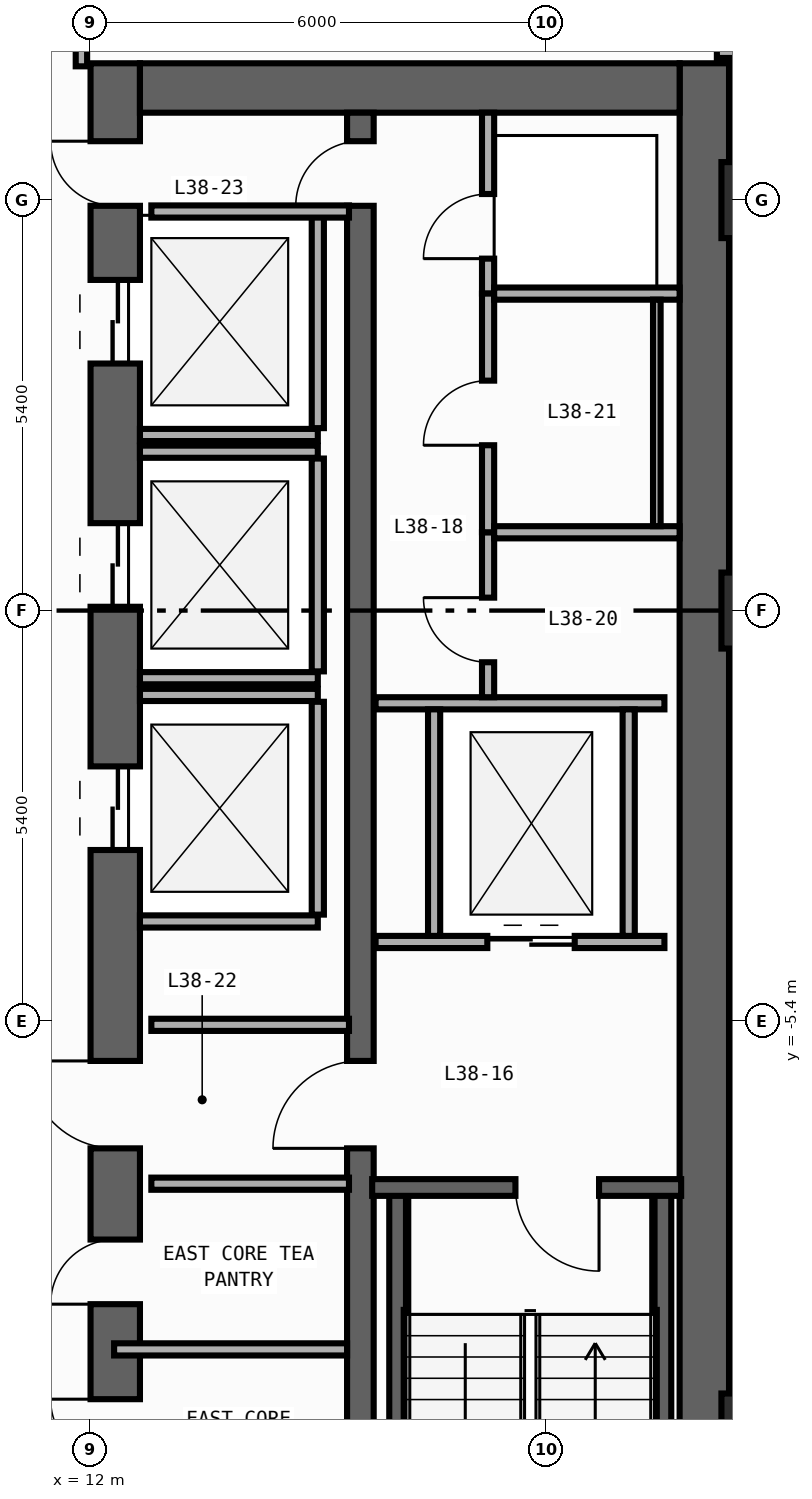
"""IFC4 building model, lengths in metres.
Left out: names, types, materials, properties, quantities, classifications, styles, units other than length and angle.
Written with IfcOpenShell. Run it as: python <this file> out.ifc"""

import sys

from ifc_helpers import new_model, si_unit, direction, frame, frame_2d, origin, origin_2d, place, context, subcontext, project, spatial, rectangle, extrude, element, fill, save


model = new_model("IFC4")
c1 = context("Model", 3, precision=1e-05, world=origin(), true_north=direction((0.0, 1.0)))
c2 = subcontext(c1, "Body", "Model", "MODEL_VIEW")
j1 = project(units=[si_unit("LENGTHUNIT", "METRE"), si_unit("PLANEANGLEUNIT", "RADIAN")], contexts=[c1])
p1 = place(None, origin())
s1 = spatial("IfcSite", under=j1, at=p1, CompositionType="ELEMENT")
p2 = place(p1, origin())
s2 = spatial("IfcBuilding", under=s1, at=p2, CompositionType="ELEMENT")
p3 = place(p2, frame((0.0, 0.0, 168.8)))
s3 = spatial("IfcBuildingStorey", under=s2, at=p3, CompositionType="ELEMENT", Elevation=168.8)
p4 = place(p3, frame((12.325, -19.8, 0.0), z_axis=(0.0, 0.0, 1.0), x_axis=(0.0, 1.0, 0.0)))
e1 = element("IfcWall", 1, at=p4, inside=s3, PredefinedType="SHEAR", context=c2, shape_type="SweptSolid", body=[
    extrude(rectangle(XDim=27.0, YDim=0.65, at=frame_2d((13.5, 0.0))), origin(), (0.0, 0.0, 1.0), 3.54),
])
p5 = place(p4, frame((23.05, 0.0, 0.0)))
e2 = element("IfcOpeningElement", 2, at=p5, cuts=e1, PredefinedType="OPENING", context=c2, shape_type="SweptSolid", body=[
    extrude(rectangle(XDim=1.1, YDim=2.2, at=frame_2d((0.55, 1.1))), frame((0.0, 0.335, 0.0), z_axis=(0.0, -1.0, 0.0), x_axis=(1.0, 0.0, 0.0)), (0.0, 0.0, 1.0), 0.67),
])
p6 = place(p4, frame((19.85, 0.0, 0.0)))
e3 = element("IfcOpeningElement", 3, at=p6, cuts=e1, PredefinedType="OPENING", context=c2, shape_type="SweptSolid", body=[
    extrude(rectangle(XDim=1.1, YDim=2.2, at=frame_2d((0.55, 1.1))), frame((0.0, 0.335, 0.0), z_axis=(0.0, -1.0, 0.0), x_axis=(1.0, 0.0, 0.0)), (0.0, 0.0, 1.0), 0.67),
])
p7 = place(p4, frame((16.65, 0.0, 0.0)))
e4 = element("IfcOpeningElement", 4, at=p7, cuts=e1, PredefinedType="OPENING", context=c2, shape_type="SweptSolid", body=[
    extrude(rectangle(XDim=1.1, YDim=2.2, at=frame_2d((0.55, 1.1))), frame((0.0, 0.335, 0.0), z_axis=(0.0, -1.0, 0.0), x_axis=(1.0, 0.0, 0.0)), (0.0, 0.0, 1.0), 0.67),
])
p8 = place(p4, frame((6.275, 0.0, 0.0)))
e5 = element("IfcOpeningElement", 5, at=p8, cuts=e1, PredefinedType="OPENING", context=c2, shape_type="SweptSolid", body=[
    extrude(rectangle(XDim=0.85, YDim=2.1, at=frame_2d((0.425, 1.05))), frame((0.0, 0.335, 0.0), z_axis=(0.0, -1.0, 0.0), x_axis=(1.0, 0.0, 0.0)), (0.0, 0.0, 1.0), 0.67),
])
p9 = place(p4, frame((8.575, 0.0, 0.0)))
e6 = element("IfcOpeningElement", 6, at=p9, cuts=e1, PredefinedType="OPENING", context=c2, shape_type="SweptSolid", body=[
    extrude(rectangle(XDim=0.85, YDim=2.1, at=frame_2d((0.425, 1.05))), frame((0.0, 0.335, 0.0), z_axis=(0.0, -1.0, 0.0), x_axis=(1.0, 0.0, 0.0)), (0.0, 0.0, 1.0), 0.67),
])
p10 = place(p4, frame((10.675, 0.0, 0.0)))
e7 = element("IfcOpeningElement", 7, at=p10, cuts=e1, PredefinedType="OPENING", context=c2, shape_type="SweptSolid", body=[
    extrude(rectangle(XDim=0.85, YDim=2.1, at=frame_2d((0.425, 1.05))), frame((0.0, 0.335, 0.0), z_axis=(0.0, -1.0, 0.0), x_axis=(1.0, 0.0, 0.0)), (0.0, 0.0, 1.0), 0.67),
])
p11 = place(p4, frame((12.725, 0.0, 0.0)))
e8 = element("IfcOpeningElement", 8, at=p11, cuts=e1, PredefinedType="OPENING", context=c2, shape_type="SweptSolid", body=[
    extrude(rectangle(XDim=1.15, YDim=2.2, at=frame_2d((0.575, 1.1))), frame((0.0, 0.335, 0.0), z_axis=(0.0, -1.0, 0.0), x_axis=(1.0, 0.0, 0.0)), (0.0, 0.0, 1.0), 0.67),
])
p12 = place(p4, frame((25.125, 0.0, 0.0)))
e9 = element("IfcOpeningElement", 9, at=p12, cuts=e1, PredefinedType="OPENING", context=c2, shape_type="SweptSolid", body=[
    extrude(rectangle(XDim=0.85, YDim=2.1, at=frame_2d((0.425, 1.05))), frame((0.0, 0.335, 0.0), z_axis=(0.0, -1.0, 0.0), x_axis=(1.0, 0.0, 0.0)), (0.0, 0.0, 1.0), 0.67),
])
p13 = place(p3, frame((20.075, -19.8, 0.0), z_axis=(0.0, 0.0, 1.0), x_axis=(0.0, 1.0, 0.0)))
e10 = element("IfcWall", 10, at=p13, inside=s3, PredefinedType="SHEAR", context=c2, shape_type="SweptSolid", body=[
    extrude(rectangle(XDim=27.0, YDim=0.65, at=frame_2d((13.5, 0.0))), origin(), (0.0, 0.0, 1.0), 3.54),
])
p14 = place(p3, frame((12.65, 6.875, 0.0), z_axis=(0.0, 0.0, 1.0), x_axis=(1.0, 0.0, 0.0)))
e11 = element("IfcWall", 11, at=p14, inside=s3, PredefinedType="SHEAR", context=c2, shape_type="SweptSolid", body=[
    extrude(rectangle(XDim=7.1, YDim=0.65, at=frame_2d((3.55, 0.0))), origin(), (0.0, 0.0, 1.0), 3.54),
])
p15 = place(p3, frame((15.55, -19.15, 0.0), z_axis=(0.0, 0.0, 1.0), x_axis=(0.0, 1.0, 0.0)))
e12 = element("IfcWall", 12, at=p15, inside=s3, PredefinedType="SHEAR", context=c2, shape_type="SweptSolid", body=[
    extrude(rectangle(XDim=25.7, YDim=0.35, at=frame_2d((12.85, 0.0))), origin(), (0.0, 0.0, 1.0), 3.54),
])
p16 = place(p15, frame((12.075, 0.0, 0.0)))
e13 = element("IfcOpeningElement", 13, at=p16, cuts=e12, PredefinedType="OPENING", context=c2, shape_type="SweptSolid", body=[
    extrude(rectangle(XDim=1.15, YDim=2.2, at=frame_2d((0.575, 1.1))), frame((0.0, 0.185, 0.0), z_axis=(0.0, -1.0, 0.0), x_axis=(1.0, 0.0, 0.0)), (0.0, 0.0, 1.0), 0.37),
])
p17 = place(p15, frame((24.475, 0.0, 0.0)))
e14 = element("IfcOpeningElement", 14, at=p17, cuts=e12, PredefinedType="OPENING", context=c2, shape_type="SweptSolid", body=[
    extrude(rectangle(XDim=0.85, YDim=2.1, at=frame_2d((0.425, 1.05))), frame((0.0, 0.185, 0.0), z_axis=(0.0, -1.0, 0.0), x_axis=(1.0, 0.0, 0.0)), (0.0, 0.0, 1.0), 0.37),
])
for number, where, z_axis, x_axis in (
    (15, (16.04, -19.01, 0.0), (0.0, 0.0, 1.0), (0.0, 1.0, 0.0)),
    (16, (19.53, -19.01, 0.0), (0.0, 0.0, 1.0), (0.0, 1.0, 0.0)),
):
    element("IfcWall", number, at=place(p3, frame(where, z_axis=z_axis, x_axis=x_axis)), inside=s3, PredefinedType="SHEAR", context=c2, shape_type="SweptSolid", body=[
        extrude(rectangle(XDim=11.42, YDim=0.22, at=frame_2d((5.71, 0.0))), origin(), (0.0, 0.0, 1.0), 3.54),
    ])
p18 = place(p3, frame((19.77, -7.59, 0.0), z_axis=(0.0, 0.0, 1.0), x_axis=(-1.0, 0.0, 0.0)))
e17 = element("IfcWall", 17, at=p18, inside=s3, PredefinedType="SHEAR", context=c2, shape_type="SweptSolid", body=[
    extrude(rectangle(XDim=4.065, YDim=0.22, at=frame_2d((2.032, 0.0))), origin(), (0.0, 0.0, 1.0), 3.54),
])
p19 = place(p18, frame((1.08, 0.0, 0.0)))
e18 = element("IfcOpeningElement", 18, at=p19, cuts=e17, PredefinedType="OPENING", context=c2, shape_type="SweptSolid", body=[
    extrude(rectangle(XDim=1.1, YDim=2.2, at=frame_2d((0.55, 1.1))), frame((0.0, 0.12, 0.0), z_axis=(0.0, -1.0, 0.0), x_axis=(1.0, 0.0, 0.0)), (0.0, 0.0, 1.0), 0.24),
])
for number, where, z_axis, x_axis in (
    (19, (20.8, -10.8, 0.0), (0.0, 0.0, 1.0), (1.0, 0.0, 0.0)),
    (20, (20.8, 0.0, 0.0), (0.0, 0.0, 1.0), (1.0, 0.0, 0.0)),
    (21, (20.8, 5.4, 0.0), (0.0, 0.0, 1.0), (1.0, 0.0, 0.0)),
):
    element("IfcColumn", number, at=place(p3, frame(where, z_axis=z_axis, x_axis=x_axis)), inside=s3, PredefinedType="COLUMN", context=c2, shape_type="SweptSolid", body=[
        extrude(rectangle(XDim=1.0, YDim=1.0, at=origin_2d()), origin(), (0.0, 0.0, 1.0), 3.8),
    ])
p20 = place(p3, frame((12.65, 2.31, 0.0), z_axis=(0.0, 0.0, 1.0), x_axis=(1.0, 0.0, 0.0)))
e22 = element("IfcWall", 22, at=p20, inside=s3, PredefinedType="STANDARD", context=c2, shape_type="SweptSolid", body=[
    extrude(rectangle(XDim=2.34, YDim=0.16, at=frame_2d((1.17, 0.0))), origin(), (0.0, 0.0, 1.0), 3.54),
])
p21 = place(p3, frame((14.99, 2.4, 0.0), z_axis=(0.0, 0.0, 1.0), x_axis=(0.0, 1.0, 0.0)))
e23 = element("IfcWall", 23, at=p21, inside=s3, PredefinedType="STANDARD", context=c2, shape_type="SweptSolid", body=[
    extrude(rectangle(XDim=2.8, YDim=0.16, at=frame_2d((1.4, 0.0))), origin(), (0.0, 0.0, 1.0), 3.54),
])
for number, where, z_axis, x_axis in (
    (24, (12.65, -0.89, 0.0), (0.0, 0.0, 1.0), (1.0, 0.0, 0.0)),
    (25, (12.65, 2.09, 0.0), (0.0, 0.0, 1.0), (1.0, 0.0, 0.0)),
):
    element("IfcWall", number, at=place(p3, frame(where, z_axis=z_axis, x_axis=x_axis)), inside=s3, PredefinedType="STANDARD", context=c2, shape_type="SweptSolid", body=[
        extrude(rectangle(XDim=2.34, YDim=0.16, at=frame_2d((1.17, 0.0))), origin(), (0.0, 0.0, 1.0), 3.54),
    ])
p22 = place(p3, frame((14.99, -0.8, 0.0), z_axis=(0.0, 0.0, 1.0), x_axis=(0.0, 1.0, 0.0)))
e26 = element("IfcWall", 26, at=p22, inside=s3, PredefinedType="STANDARD", context=c2, shape_type="SweptSolid", body=[
    extrude(rectangle(XDim=2.8, YDim=0.16, at=frame_2d((1.4, 0.0))), origin(), (0.0, 0.0, 1.0), 3.54),
])
for number, where, z_axis, x_axis in (
    (27, (12.65, -4.09, 0.0), (0.0, 0.0, 1.0), (1.0, 0.0, 0.0)),
    (28, (12.65, -1.11, 0.0), (0.0, 0.0, 1.0), (1.0, 0.0, 0.0)),
):
    element("IfcWall", number, at=place(p3, frame(where, z_axis=z_axis, x_axis=x_axis)), inside=s3, PredefinedType="STANDARD", context=c2, shape_type="SweptSolid", body=[
        extrude(rectangle(XDim=2.34, YDim=0.16, at=frame_2d((1.17, 0.0))), origin(), (0.0, 0.0, 1.0), 3.54),
    ])
p23 = place(p3, frame((14.99, -4.0, 0.0), z_axis=(0.0, 0.0, 1.0), x_axis=(0.0, 1.0, 0.0)))
e29 = element("IfcWall", 29, at=p23, inside=s3, PredefinedType="STANDARD", context=c2, shape_type="SweptSolid", body=[
    extrude(rectangle(XDim=2.8, YDim=0.16, at=frame_2d((1.4, 0.0))), origin(), (0.0, 0.0, 1.0), 3.54),
])
p24 = place(p3, frame((15.75, -4.36, 0.0), z_axis=(0.0, 0.0, 1.0), x_axis=(1.0, 0.0, 0.0)))
e30 = element("IfcWall", 30, at=p24, inside=s3, PredefinedType="STANDARD", context=c2, shape_type="SweptSolid", body=[
    extrude(rectangle(XDim=3.8, YDim=0.16, at=frame_2d((1.9, 0.0))), origin(), (0.0, 0.0, 1.0), 3.54),
])
p25 = place(p24, frame((1.47, 0.0, 0.0)))
e31 = element("IfcOpeningElement", 31, at=p25, cuts=e30, PredefinedType="OPENING", context=c2, shape_type="SweptSolid", body=[
    extrude(rectangle(XDim=1.15, YDim=2.2, at=frame_2d((0.575, 1.1))), frame((0.0, 0.09, 0.0), z_axis=(0.0, -1.0, 0.0), x_axis=(1.0, 0.0, 0.0)), (0.0, 0.0, 1.0), 0.18),
])
p26 = place(p3, frame((15.75, -1.22, 0.0), z_axis=(0.0, 0.0, 1.0), x_axis=(1.0, 0.0, 0.0)))
e32 = element("IfcWall", 32, at=p26, inside=s3, PredefinedType="STANDARD", context=c2, shape_type="SweptSolid", body=[
    extrude(rectangle(XDim=3.8, YDim=0.16, at=frame_2d((1.9, 0.0))), origin(), (0.0, 0.0, 1.0), 3.54),
])
for number, where, z_axis, x_axis in (
    (33, (16.52, -4.28, 0.0), (0.0, 0.0, 1.0), (0.0, 1.0, 0.0)),
    (34, (19.08, -4.28, 0.0), (0.0, 0.0, 1.0), (0.0, 1.0, 0.0)),
):
    element("IfcWall", number, at=place(p3, frame(where, z_axis=z_axis, x_axis=x_axis)), inside=s3, PredefinedType="STANDARD", context=c2, shape_type="SweptSolid", body=[
        extrude(rectangle(XDim=2.98, YDim=0.16, at=frame_2d((1.49, 0.0))), origin(), (0.0, 0.0, 1.0), 3.54),
    ])
for number, where, z_axis, x_axis in (
    (35, (12.8, -5.45, 0.0), (0.0, 0.0, 1.0), (1.0, 0.0, 0.0)),
    (36, (12.8, -7.54, 0.0), (0.0, 0.0, 1.0), (1.0, 0.0, 0.0)),
    (37, (12.8, 5.25, 0.0), (0.0, 0.0, 1.0), (1.0, 0.0, 0.0)),
):
    element("IfcWall", number, at=place(p3, frame(where, z_axis=z_axis, x_axis=x_axis)), inside=s3, PredefinedType="STANDARD", context=c2, shape_type="SweptSolid", body=[
        extrude(rectangle(XDim=2.6, YDim=0.16, at=frame_2d((1.3, 0.0))), origin(), (0.0, 0.0, 1.0), 3.54),
    ])
p27 = place(p3, frame((17.23, 4.17, 0.0), z_axis=(0.0, 0.0, 1.0), x_axis=(0.0, 1.0, 0.0)))
e38 = element("IfcWall", 38, at=p27, inside=s3, PredefinedType="PARTITIONING", context=c2, shape_type="SweptSolid", body=[
    extrude(rectangle(XDim=2.38, YDim=0.16, at=frame_2d((1.19, 0.0))), origin(), (0.0, 0.0, 1.0), 3.54),
])
p28 = place(p27, frame((0.46, 0.0, 0.0)))
e39 = element("IfcOpeningElement", 39, at=p28, cuts=e38, PredefinedType="OPENING", context=c2, shape_type="SweptSolid", body=[
    extrude(rectangle(XDim=0.85, YDim=2.1, at=frame_2d((0.425, 1.05))), frame((0.0, 0.09, 0.0), z_axis=(0.0, -1.0, 0.0), x_axis=(1.0, 0.0, 0.0)), (0.0, 0.0, 1.0), 0.18),
])
p29 = place(p3, frame((17.23, -1.14, 0.0), z_axis=(0.0, 0.0, 1.0), x_axis=(0.0, 1.0, 0.0)))
e40 = element("IfcWall", 40, at=p29, inside=s3, PredefinedType="PARTITIONING", context=c2, shape_type="SweptSolid", body=[
    extrude(rectangle(XDim=2.17, YDim=0.16, at=frame_2d((1.085, 0.0))), origin(), (0.0, 0.0, 1.0), 3.54),
])
p30 = place(p29, frame((0.46, 0.0, 0.0)))
e41 = element("IfcOpeningElement", 41, at=p30, cuts=e40, PredefinedType="OPENING", context=c2, shape_type="SweptSolid", body=[
    extrude(rectangle(XDim=0.85, YDim=2.1, at=frame_2d((0.425, 1.05))), frame((0.0, 0.09, 0.0), z_axis=(0.0, -1.0, 0.0), x_axis=(1.0, 0.0, 0.0)), (0.0, 0.0, 1.0), 0.18),
])
p31 = place(p3, frame((17.23, 1.03, 0.0), z_axis=(0.0, 0.0, 1.0), x_axis=(0.0, 1.0, 0.0)))
e42 = element("IfcWall", 42, at=p31, inside=s3, PredefinedType="PARTITIONING", context=c2, shape_type="SweptSolid", body=[
    extrude(rectangle(XDim=3.14, YDim=0.16, at=frame_2d((1.57, 0.0))), origin(), (0.0, 0.0, 1.0), 3.54),
])
p32 = place(p31, frame((1.145, 0.0, 0.0)))
e43 = element("IfcOpeningElement", 43, at=p32, cuts=e42, PredefinedType="OPENING", context=c2, shape_type="SweptSolid", body=[
    extrude(rectangle(XDim=0.85, YDim=2.1, at=frame_2d((0.425, 1.05))), frame((0.0, 0.09, 0.0), z_axis=(0.0, -1.0, 0.0), x_axis=(1.0, 0.0, 0.0)), (0.0, 0.0, 1.0), 0.18),
])
for number, where, z_axis, x_axis in (
    (44, (17.31, 4.17, 0.0), (0.0, 0.0, 1.0), (1.0, 0.0, 0.0)),
    (45, (17.31, 1.03, 0.0), (0.0, 0.0, 1.0), (1.0, 0.0, 0.0)),
):
    element("IfcWall", number, at=place(p3, frame(where, z_axis=z_axis, x_axis=x_axis)), inside=s3, PredefinedType="PARTITIONING", context=c2, shape_type="SweptSolid", body=[
        extrude(rectangle(XDim=2.44, YDim=0.16, at=frame_2d((1.22, 0.0))), origin(), (0.0, 0.0, 1.0), 3.54),
    ])
p33 = place(p3, frame((12.31, -9.72, 0.0), z_axis=(0.0, 0.0, 1.0), x_axis=(1.0, 0.0, 0.0)))
e46 = element("IfcWall", 46, at=p33, inside=s3, PredefinedType="PARTITIONING", context=c2, shape_type="SweptSolid", body=[
    extrude(rectangle(XDim=3.065, YDim=0.16, at=frame_2d((1.532, 0.0))), origin(), (0.0, 0.0, 1.0), 3.54),
])
p34 = place(p3, frame((11.88, 7.16, 0.0), z_axis=(0.0, 0.0, 1.0), x_axis=(0.0, 1.0, 0.0)))
e47 = element("IfcWall", 47, at=p34, inside=s3, PredefinedType="PARTITIONING", context=c2, shape_type="SweptSolid", body=[
    extrude(rectangle(XDim=8.455, YDim=0.15, at=frame_2d((4.228, 0.0))), origin(), (0.0, 0.0, 1.0), 3.54),
])
p35 = place(p34, frame((0.46, 0.0, 0.0)))
e48 = element("IfcOpeningElement", 48, at=p35, cuts=e47, PredefinedType="OPENING", context=c2, shape_type="SweptSolid", body=[
    extrude(rectangle(XDim=0.9, YDim=2.15, at=frame_2d((0.45, 1.075))), frame((0.0, 0.085, 0.0), z_axis=(0.0, -1.0, 0.0), x_axis=(1.0, 0.0, 0.0)), (0.0, 0.0, 1.0), 0.17),
])
p36 = place(p3, frame((20.24, 7.34, 0.0), z_axis=(0.0, 0.0, 1.0), x_axis=(1.0, 0.0, 0.0)))
e49 = element("IfcWall", 49, at=p36, inside=s3, PredefinedType="PARTITIONING", context=c2, shape_type="SweptSolid", body=[
    extrude(rectangle(XDim=2.215, YDim=0.14, at=frame_2d((1.107, 0.0))), origin(), (0.0, 0.0, 1.0), 3.54),
])
p37 = place(p36, frame((0.905, 0.0, 0.0)))
e50 = element("IfcOpeningElement", 50, at=p37, cuts=e49, PredefinedType="OPENING", context=c2, shape_type="SweptSolid", body=[
    extrude(rectangle(XDim=0.85, YDim=2.1, at=frame_2d((0.425, 1.05))), frame((0.0, 0.08, 0.0), z_axis=(0.0, -1.0, 0.0), x_axis=(1.0, 0.0, 0.0)), (0.0, 0.0, 1.0), 0.16),
])
p38 = place(p3, frame((19.45, 4.09, 0.0), z_axis=(0.0, 0.0, 1.0), x_axis=(0.0, -1.0, 0.0)))
e51 = element("IfcWall", 51, at=p38, inside=s3, PredefinedType="PARTITIONING", context=c2, shape_type="SweptSolid", body=[
    extrude(rectangle(XDim=2.98, YDim=0.1, at=frame_2d((1.49, 0.0))), origin(), (0.0, 0.0, 1.0), 3.54),
])
p39 = place(p19, origin())
e52 = element("IfcDoor", 52, at=p39, inside=s3, OperationType="SINGLE_SWING_LEFT", PredefinedType="DOOR", context=c2, shape_type="SweptSolid", body=[
    extrude(rectangle(XDim=1.1, YDim=2.2, at=frame_2d((0.55, 1.1))), frame((0.0, 0.025, 0.0), z_axis=(0.0, -1.0, 0.0), x_axis=(1.0, 0.0, 0.0)), (0.0, 0.0, 1.0), 0.05),
])
fill(e18, e52)
p40 = place(p5, origin())
e53 = element("IfcDoor", 53, at=p40, inside=s3, OperationType="DOUBLE_DOOR_SLIDING", PredefinedType="DOOR", context=c2, shape_type="SweptSolid", body=[
    extrude(rectangle(XDim=1.1, YDim=2.2, at=frame_2d((0.55, 1.1))), frame((0.0, 0.025, 0.0), z_axis=(0.0, -1.0, 0.0), x_axis=(1.0, 0.0, 0.0)), (0.0, 0.0, 1.0), 0.05),
])
fill(e2, e53)
p41 = place(p6, origin())
e54 = element("IfcDoor", 54, at=p41, inside=s3, OperationType="DOUBLE_DOOR_SLIDING", PredefinedType="DOOR", context=c2, shape_type="SweptSolid", body=[
    extrude(rectangle(XDim=1.1, YDim=2.2, at=frame_2d((0.55, 1.1))), frame((0.0, 0.025, 0.0), z_axis=(0.0, -1.0, 0.0), x_axis=(1.0, 0.0, 0.0)), (0.0, 0.0, 1.0), 0.05),
])
fill(e3, e54)
p42 = place(p7, origin())
e55 = element("IfcDoor", 55, at=p42, inside=s3, OperationType="DOUBLE_DOOR_SLIDING", PredefinedType="DOOR", context=c2, shape_type="SweptSolid", body=[
    extrude(rectangle(XDim=1.1, YDim=2.2, at=frame_2d((0.55, 1.1))), frame((0.0, 0.025, 0.0), z_axis=(0.0, -1.0, 0.0), x_axis=(1.0, 0.0, 0.0)), (0.0, 0.0, 1.0), 0.05),
])
fill(e4, e55)
p43 = place(p9, origin())
e56 = element("IfcDoor", 56, at=p43, inside=s3, OperationType="SINGLE_SWING_RIGHT", PredefinedType="DOOR", context=c2, shape_type="SweptSolid", body=[
    extrude(rectangle(XDim=0.85, YDim=2.1, at=frame_2d((0.425, 1.05))), frame((0.0, 0.025, 0.0), z_axis=(0.0, -1.0, 0.0), x_axis=(1.0, 0.0, 0.0)), (0.0, 0.0, 1.0), 0.05),
])
fill(e6, e56)
p44 = place(p10, origin())
e57 = element("IfcDoor", 57, at=p44, inside=s3, OperationType="SINGLE_SWING_LEFT", PredefinedType="DOOR", context=c2, shape_type="SweptSolid", body=[
    extrude(rectangle(XDim=0.85, YDim=2.1, at=frame_2d((0.425, 1.05))), frame((0.0, 0.025, 0.0), z_axis=(0.0, -1.0, 0.0), x_axis=(1.0, 0.0, 0.0)), (0.0, 0.0, 1.0), 0.05),
])
fill(e7, e57)
p45 = place(p11, origin())
e58 = element("IfcDoor", 58, at=p45, inside=s3, OperationType="SINGLE_SWING_RIGHT", PredefinedType="DOOR", context=c2, shape_type="SweptSolid", body=[
    extrude(rectangle(XDim=1.15, YDim=2.2, at=frame_2d((0.575, 1.1))), frame((0.0, 0.025, 0.0), z_axis=(0.0, -1.0, 0.0), x_axis=(1.0, 0.0, 0.0)), (0.0, 0.0, 1.0), 0.05),
])
fill(e8, e58)
p46 = place(p16, origin())
e59 = element("IfcDoor", 59, at=p46, inside=s3, OperationType="SINGLE_SWING_LEFT", PredefinedType="DOOR", context=c2, shape_type="SweptSolid", body=[
    extrude(rectangle(XDim=1.15, YDim=2.2, at=frame_2d((0.575, 1.1))), frame((0.0, 0.025, 0.0), z_axis=(0.0, -1.0, 0.0), x_axis=(1.0, 0.0, 0.0)), (0.0, 0.0, 1.0), 0.05),
])
fill(e13, e59)
p47 = place(p12, origin())
e60 = element("IfcDoor", 60, at=p47, inside=s3, OperationType="SINGLE_SWING_RIGHT", PredefinedType="DOOR", context=c2, shape_type="SweptSolid", body=[
    extrude(rectangle(XDim=0.85, YDim=2.1, at=frame_2d((0.425, 1.05))), frame((0.0, 0.025, 0.0), z_axis=(0.0, -1.0, 0.0), x_axis=(1.0, 0.0, 0.0)), (0.0, 0.0, 1.0), 0.05),
])
fill(e9, e60)
p48 = place(p17, origin())
e61 = element("IfcDoor", 61, at=p48, inside=s3, OperationType="SINGLE_SWING_LEFT", PredefinedType="DOOR", context=c2, shape_type="SweptSolid", body=[
    extrude(rectangle(XDim=0.85, YDim=2.1, at=frame_2d((0.425, 1.05))), frame((0.0, 0.025, 0.0), z_axis=(0.0, -1.0, 0.0), x_axis=(1.0, 0.0, 0.0)), (0.0, 0.0, 1.0), 0.05),
])
fill(e14, e61)
p49 = place(p25, origin())
e62 = element("IfcDoor", 62, at=p49, inside=s3, OperationType="DOUBLE_DOOR_SLIDING", PredefinedType="DOOR", context=c2, shape_type="SweptSolid", body=[
    extrude(rectangle(XDim=1.15, YDim=2.2, at=frame_2d((0.575, 1.1))), frame((0.0, 0.025, 0.0), z_axis=(0.0, -1.0, 0.0), x_axis=(1.0, 0.0, 0.0)), (0.0, 0.0, 1.0), 0.05),
])
fill(e31, e62)
p50 = place(p28, origin())
e63 = element("IfcDoor", 63, at=p50, inside=s3, OperationType="SINGLE_SWING_LEFT", PredefinedType="DOOR", context=c2, shape_type="SweptSolid", body=[
    extrude(rectangle(XDim=0.85, YDim=2.1, at=frame_2d((0.425, 1.05))), frame((0.0, 0.025, 0.0), z_axis=(0.0, -1.0, 0.0), x_axis=(1.0, 0.0, 0.0)), (0.0, 0.0, 1.0), 0.05),
])
fill(e39, e63)
p51 = place(p30, origin())
e64 = element("IfcDoor", 64, at=p51, inside=s3, OperationType="SINGLE_SWING_RIGHT", PredefinedType="DOOR", context=c2, shape_type="SweptSolid", body=[
    extrude(rectangle(XDim=0.85, YDim=2.1, at=frame_2d((0.425, 1.05))), frame((0.0, 0.025, 0.0), z_axis=(0.0, -1.0, 0.0), x_axis=(1.0, 0.0, 0.0)), (0.0, 0.0, 1.0), 0.05),
])
fill(e41, e64)
p52 = place(p32, origin())
e65 = element("IfcDoor", 65, at=p52, inside=s3, OperationType="SINGLE_SWING_LEFT", PredefinedType="DOOR", context=c2, shape_type="SweptSolid", body=[
    extrude(rectangle(XDim=0.85, YDim=2.1, at=frame_2d((0.425, 1.05))), frame((0.0, 0.025, 0.0), z_axis=(0.0, -1.0, 0.0), x_axis=(1.0, 0.0, 0.0)), (0.0, 0.0, 1.0), 0.05),
])
fill(e43, e65)
save(model, sys.argv[1])
